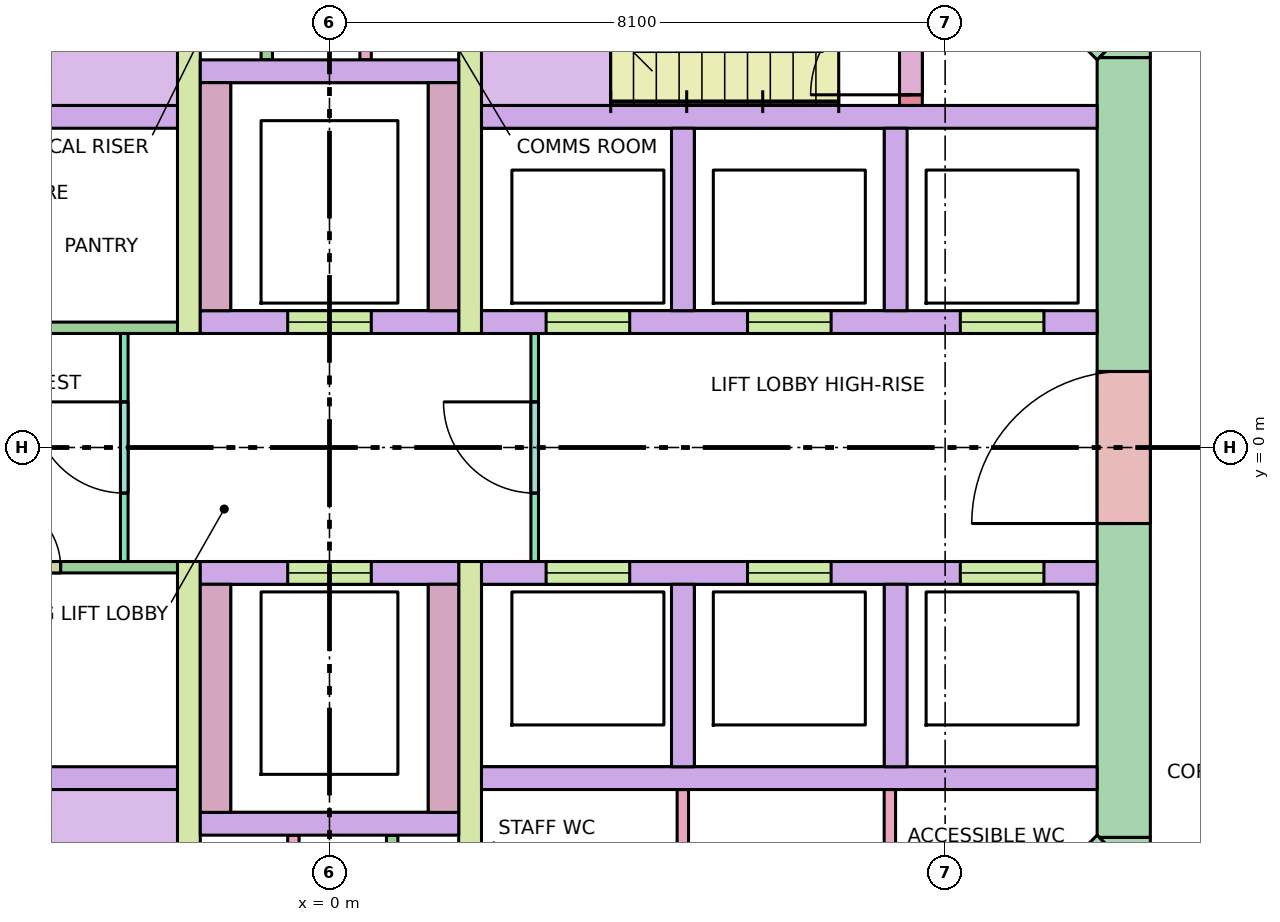
"""IFC4 building model, lengths in metres.
Left out: names, types, materials, properties, quantities, classifications, styles, units other than length and angle.
Written with IfcOpenShell. Run it as: python <this file> out.ifc"""

import sys

from ifc_helpers import new_model, si_unit, direction, frame, frame_2d, origin, place, context, subcontext, project, spatial, polyline, rectangle, outline, extrude, element, fill, save


model = new_model("IFC4")
c1 = context("Model", 3, precision=1e-05, world=origin(), true_north=direction((0.0, 1.0)))
c2 = subcontext(c1, "Body", "Model", "MODEL_VIEW")
j1 = project(units=[si_unit("LENGTHUNIT", "METRE"), si_unit("PLANEANGLEUNIT", "RADIAN")], contexts=[c1])
p1 = place(None, origin())
s1 = spatial("IfcSite", under=j1, at=p1, CompositionType="ELEMENT")
p2 = place(p1, origin())
s2 = spatial("IfcBuilding", under=s1, at=p2, CompositionType="ELEMENT")
p3 = place(p2, frame((0.0, 0.0, 203.9)))
s3 = spatial("IfcBuildingStorey", under=s2, at=p3, CompositionType="ELEMENT", Elevation=203.9)
p4 = place(p3, frame((10.45, -5.13, -0.28), z_axis=(0.0, 0.0, 1.0), x_axis=(0.0, 1.0, 0.0)))
e1 = element("IfcWall", 1, at=p4, inside=s3, PredefinedType="SHEAR", context=c2, shape_type="SweptSolid", body=[
    extrude(rectangle(XDim=10.26, YDim=0.7, at=frame_2d((5.13, 0.0))), origin(), (0.0, 0.0, 1.0), 3.7),
])
p5 = place(p4, frame((4.13, 0.0, 0.28)))
e2 = element("IfcOpeningElement", 2, at=p5, cuts=e1, PredefinedType="OPENING", context=c2, shape_type="SweptSolid", body=[
    extrude(rectangle(XDim=2.0, YDim=2.1, at=frame_2d((1.0, 1.05))), frame((0.0, 0.36, 0.0), z_axis=(0.0, -1.0, 0.0), x_axis=(1.0, 0.0, 0.0)), (0.0, 0.0, 1.0), 0.72),
])
p6 = place(p3, frame((7.347, 8.347, -0.28), z_axis=(0.0, 0.0, 1.0), x_axis=(0.707106781187, -0.707106781187, 0.0)))
e3 = element("IfcWall", 3, at=p6, inside=s3, PredefinedType="SHEAR", context=c2, shape_type="SweptSolid", body=[
    extrude(rectangle(XDim=4.243, YDim=0.7, at=frame_2d((2.121, 0.0))), origin(), (0.0, 0.0, 1.0), 3.7),
])
p7 = place(p6, frame((2.393, 0.0, 0.28)))
e4 = element("IfcOpeningElement", 4, at=p7, cuts=e3, PredefinedType="OPENING", context=c2, shape_type="SweptSolid", body=[
    extrude(rectangle(XDim=1.2, YDim=2.1, at=frame_2d((0.6, 1.05))), frame((0.0, 0.36, 0.0), z_axis=(0.0, -1.0, 0.0), x_axis=(1.0, 0.0, 0.0)), (0.0, 0.0, 1.0), 0.72),
])
p8 = place(p3, frame((10.347, -5.347, -0.28), z_axis=(0.0, 0.0, 1.0), x_axis=(-0.707106781187, -0.707106781187, 0.0)))
e5 = element("IfcWall", 5, at=p8, inside=s3, PredefinedType="SHEAR", context=c2, shape_type="SweptSolid", body=[
    extrude(rectangle(XDim=4.243, YDim=0.7, at=frame_2d((2.121, 0.0))), origin(), (0.0, 0.0, 1.0), 3.7),
])
p9 = place(p8, frame((0.52, 0.0, 0.28)))
e6 = element("IfcOpeningElement", 6, at=p9, cuts=e5, PredefinedType="OPENING", context=c2, shape_type="SweptSolid", body=[
    extrude(rectangle(XDim=0.9, YDim=2.1, at=frame_2d((0.45, 1.05))), frame((0.0, 0.36, 0.0), z_axis=(0.0, -1.0, 0.0), x_axis=(1.0, 0.0, 0.0)), (0.0, 0.0, 1.0), 0.72),
])
p10 = place(p3, frame((0.0, 0.0, -0.28)))
e7 = element("IfcWall", 7, at=p10, inside=s3, PredefinedType="SHEAR", context=c2, shape_type="SweptSolid", body=[
    extrude(outline(polyline([(10.8, -5.39), (10.595, -5.595), (10.595, -5.595), (10.595, -5.595), (10.13, -5.13), (10.8, -5.13), (10.8, -5.13), (10.8, -5.39)])), origin(), (0.0, 0.0, 1.0), 3.7),
])
p11 = place(p3, frame((0.0, 0.0, -0.28)))
e8 = element("IfcWall", 8, at=p11, inside=s3, PredefinedType="SHEAR", context=c2, shape_type="SweptSolid", body=[
    extrude(outline(polyline([(10.8, 5.39), (10.8, 5.13), (10.8, 5.13), (10.13, 5.13), (10.595, 5.595), (10.595, 5.595), (10.595, 5.595), (10.8, 5.39)])), origin(), (0.0, 0.0, 1.0), 3.7),
])
for number, where, z_axis, x_axis in (
    (9, (-10.1, 4.35, 0.0), (0.0, 0.0, 1.0), (1.0, 0.0, 0.0)),
    (10, (-10.1, -4.35, 0.0), (0.0, 0.0, 1.0), (1.0, 0.0, 0.0)),
    (11, (2.0, 4.35, 0.0), (0.0, 0.0, 1.0), (1.0, 0.0, 0.0)),
    (12, (2.0, -4.35, 0.0), (0.0, 0.0, 1.0), (1.0, 0.0, 0.0)),
):
    element("IfcWall", number, at=place(p3, frame(where, z_axis=z_axis, x_axis=x_axis)), inside=s3, PredefinedType="SOLIDWALL", context=c2, shape_type="SweptSolid", body=[
        extrude(rectangle(XDim=8.1, YDim=0.3, at=frame_2d((4.05, 0.0))), origin(), (0.0, 0.0, 1.0), 3.42),
    ])
p12 = place(p3, frame((2.0, 1.65, 0.0), z_axis=(0.0, 0.0, 1.0), x_axis=(1.0, 0.0, 0.0)))
e13 = element("IfcWall", 13, at=p12, inside=s3, PredefinedType="SOLIDWALL", context=c2, shape_type="SweptSolid", body=[
    extrude(rectangle(XDim=8.1, YDim=0.3, at=frame_2d((4.05, 0.0))), origin(), (0.0, 0.0, 1.0), 3.42),
])
p13 = place(p12, frame((0.85, 0.0, 0.0)))
e14 = element("IfcOpeningElement", 14, at=p13, cuts=e13, PredefinedType="OPENING", context=c2, shape_type="SweptSolid", body=[
    extrude(rectangle(XDim=1.1, YDim=2.1, at=frame_2d((0.55, 1.05))), frame((0.0, 0.16, 0.0), z_axis=(0.0, -1.0, 0.0), x_axis=(1.0, 0.0, 0.0)), (0.0, 0.0, 1.0), 0.32),
])
p14 = place(p12, frame((3.5, 0.0, 0.0)))
e15 = element("IfcOpeningElement", 15, at=p14, cuts=e13, PredefinedType="OPENING", context=c2, shape_type="SweptSolid", body=[
    extrude(rectangle(XDim=1.1, YDim=2.1, at=frame_2d((0.55, 1.05))), frame((0.0, 0.16, 0.0), z_axis=(0.0, -1.0, 0.0), x_axis=(1.0, 0.0, 0.0)), (0.0, 0.0, 1.0), 0.32),
])
p15 = place(p12, frame((6.3, 0.0, 0.0)))
e16 = element("IfcOpeningElement", 16, at=p15, cuts=e13, PredefinedType="OPENING", context=c2, shape_type="SweptSolid", body=[
    extrude(rectangle(XDim=1.1, YDim=2.1, at=frame_2d((0.55, 1.05))), frame((0.0, 0.16, 0.0), z_axis=(0.0, -1.0, 0.0), x_axis=(1.0, 0.0, 0.0)), (0.0, 0.0, 1.0), 0.32),
])
p16 = place(p3, frame((2.0, -1.65, 0.0), z_axis=(0.0, 0.0, 1.0), x_axis=(1.0, 0.0, 0.0)))
e17 = element("IfcWall", 17, at=p16, inside=s3, PredefinedType="SOLIDWALL", context=c2, shape_type="SweptSolid", body=[
    extrude(rectangle(XDim=8.1, YDim=0.3, at=frame_2d((4.05, 0.0))), origin(), (0.0, 0.0, 1.0), 3.42),
])
p17 = place(p16, frame((0.85, 0.0, 0.0)))
e18 = element("IfcOpeningElement", 18, at=p17, cuts=e17, PredefinedType="OPENING", context=c2, shape_type="SweptSolid", body=[
    extrude(rectangle(XDim=1.1, YDim=2.1, at=frame_2d((0.55, 1.05))), frame((0.0, 0.16, 0.0), z_axis=(0.0, -1.0, 0.0), x_axis=(1.0, 0.0, 0.0)), (0.0, 0.0, 1.0), 0.32),
])
p18 = place(p16, frame((3.5, 0.0, 0.0)))
e19 = element("IfcOpeningElement", 19, at=p18, cuts=e17, PredefinedType="OPENING", context=c2, shape_type="SweptSolid", body=[
    extrude(rectangle(XDim=1.1, YDim=2.1, at=frame_2d((0.55, 1.05))), frame((0.0, 0.16, 0.0), z_axis=(0.0, -1.0, 0.0), x_axis=(1.0, 0.0, 0.0)), (0.0, 0.0, 1.0), 0.32),
])
p19 = place(p16, frame((6.3, 0.0, 0.0)))
e20 = element("IfcOpeningElement", 20, at=p19, cuts=e17, PredefinedType="OPENING", context=c2, shape_type="SweptSolid", body=[
    extrude(rectangle(XDim=1.1, YDim=2.1, at=frame_2d((0.55, 1.05))), frame((0.0, 0.16, 0.0), z_axis=(0.0, -1.0, 0.0), x_axis=(1.0, 0.0, 0.0)), (0.0, 0.0, 1.0), 0.32),
])
for number, where, z_axis, x_axis in (
    (21, (4.65, 1.8, 0.0), (0.0, 0.0, 1.0), (0.0, 1.0, 0.0)),
    (22, (4.65, -4.2, 0.0), (0.0, 0.0, 1.0), (0.0, 1.0, 0.0)),
    (23, (7.45, 1.8, 0.0), (0.0, 0.0, 1.0), (0.0, 1.0, 0.0)),
    (24, (7.45, -4.2, 0.0), (0.0, 0.0, 1.0), (0.0, 1.0, 0.0)),
):
    element("IfcWall", number, at=place(p3, frame(where, z_axis=z_axis, x_axis=x_axis)), inside=s3, PredefinedType="SOLIDWALL", context=c2, shape_type="SweptSolid", body=[
        extrude(rectangle(XDim=2.4, YDim=0.3, at=frame_2d((1.2, 0.0))), origin(), (0.0, 0.0, 1.0), 3.42),
    ])
for number, where, z_axis, x_axis in (
    (25, (-1.85, 1.5, 0.0), (0.0, 0.0, 1.0), (0.0, 1.0, 0.0)),
    (26, (-1.85, -8.1, 0.0), (0.0, 0.0, 1.0), (0.0, 1.0, 0.0)),
    (27, (1.85, 1.5, 0.0), (0.0, 0.0, 1.0), (0.0, 1.0, 0.0)),
    (28, (1.85, -8.1, 0.0), (0.0, 0.0, 1.0), (0.0, 1.0, 0.0)),
):
    element("IfcWall", number, at=place(p3, frame(where, z_axis=z_axis, x_axis=x_axis)), inside=s3, PredefinedType="SHEAR", context=c2, shape_type="SweptSolid", body=[
        extrude(rectangle(XDim=6.6, YDim=0.3, at=frame_2d((3.3, 0.0))), origin(), (0.0, 0.0, 1.0), 3.42),
    ])
p20 = place(p3, frame((-1.7, 1.65, 0.0), z_axis=(0.0, 0.0, 1.0), x_axis=(1.0, 0.0, 0.0)))
e29 = element("IfcWall", 29, at=p20, inside=s3, PredefinedType="SOLIDWALL", context=c2, shape_type="SweptSolid", body=[
    extrude(rectangle(XDim=3.4, YDim=0.3, at=frame_2d((1.7, 0.0))), origin(), (0.0, 0.0, 1.0), 3.42),
])
p21 = place(p20, frame((1.15, 0.0, 0.0)))
e30 = element("IfcOpeningElement", 30, at=p21, cuts=e29, PredefinedType="OPENING", context=c2, shape_type="SweptSolid", body=[
    extrude(rectangle(XDim=1.1, YDim=2.1, at=frame_2d((0.55, 1.05))), frame((0.0, 0.16, 0.0), z_axis=(0.0, -1.0, 0.0), x_axis=(1.0, 0.0, 0.0)), (0.0, 0.0, 1.0), 0.32),
])
p22 = place(p3, frame((-1.7, -1.65, 0.0), z_axis=(0.0, 0.0, 1.0), x_axis=(1.0, 0.0, 0.0)))
e31 = element("IfcWall", 31, at=p22, inside=s3, PredefinedType="SOLIDWALL", context=c2, shape_type="SweptSolid", body=[
    extrude(rectangle(XDim=3.4, YDim=0.3, at=frame_2d((1.7, 0.0))), origin(), (0.0, 0.0, 1.0), 3.42),
])
p23 = place(p22, frame((1.15, 0.0, 0.0)))
e32 = element("IfcOpeningElement", 32, at=p23, cuts=e31, PredefinedType="OPENING", context=c2, shape_type="SweptSolid", body=[
    extrude(rectangle(XDim=1.1, YDim=2.1, at=frame_2d((0.55, 1.05))), frame((0.0, 0.16, 0.0), z_axis=(0.0, -1.0, 0.0), x_axis=(1.0, 0.0, 0.0)), (0.0, 0.0, 1.0), 0.32),
])
for number, where, z_axis, x_axis in (
    (33, (-1.5, 1.8, 0.0), (0.0, 0.0, 1.0), (0.0, 1.0, 0.0)),
    (34, (-1.5, -4.8, 0.0), (0.0, 0.0, 1.0), (0.0, 1.0, 0.0)),
    (35, (1.5, 1.8, 0.0), (0.0, 0.0, 1.0), (0.0, 1.0, 0.0)),
    (36, (1.5, -4.8, 0.0), (0.0, 0.0, 1.0), (0.0, 1.0, 0.0)),
):
    element("IfcWall", number, at=place(p3, frame(where, z_axis=z_axis, x_axis=x_axis)), inside=s3, PredefinedType="SOLIDWALL", context=c2, shape_type="SweptSolid", body=[
        extrude(rectangle(XDim=3.0, YDim=0.4, at=frame_2d((1.5, 0.0))), origin(), (0.0, 0.0, 1.0), 3.42),
    ])
for number, where, z_axis, x_axis in (
    (37, (-1.7, 4.95, 0.0), (0.0, 0.0, 1.0), (1.0, 0.0, 0.0)),
    (38, (-1.7, -4.95, 0.0), (0.0, 0.0, 1.0), (1.0, 0.0, 0.0)),
):
    element("IfcWall", number, at=place(p3, frame(where, z_axis=z_axis, x_axis=x_axis)), inside=s3, PredefinedType="SOLIDWALL", context=c2, shape_type="SweptSolid", body=[
        extrude(rectangle(XDim=3.4, YDim=0.3, at=frame_2d((1.7, 0.0))), origin(), (0.0, 0.0, 1.0), 3.42),
    ])
p24 = place(p3, frame((7.65, 4.5, 0.0), z_axis=(0.0, 0.0, 1.0), x_axis=(0.0, 1.0, 0.0)))
e39 = element("IfcWall", 39, at=p24, inside=s3, PredefinedType="SHEAR", context=c2, shape_type="SweptSolid", body=[
    extrude(rectangle(XDim=3.14, YDim=0.3, at=frame_2d((1.57, 0.0))), origin(), (0.0, 0.0, 1.0), 3.42),
])
p25 = place(p24, frame((0.14, 0.0, 0.0)))
e40 = element("IfcOpeningElement", 40, at=p25, cuts=e39, PredefinedType="OPENING", context=c2, shape_type="SweptSolid", body=[
    extrude(rectangle(XDim=1.32, YDim=2.1, at=frame_2d((0.66, 1.05))), frame((0.0, 0.16, 0.0), z_axis=(0.0, -1.0, 0.0), x_axis=(1.0, 0.0, 0.0)), (0.0, 0.0, 1.0), 0.32),
])
p26 = place(p3, frame((-2.7, -1.5, 0.0), z_axis=(0.0, 0.0, 1.0), x_axis=(0.0, 1.0, 0.0)))
e41 = element("IfcWall", 41, at=p26, inside=s3, PredefinedType="PARTITIONING", context=c2, shape_type="SweptSolid", body=[
    extrude(rectangle(XDim=3.0, YDim=0.1, at=frame_2d((1.5, 0.0))), origin(), (0.0, 0.0, 1.0), 3.42),
])
p27 = place(p26, frame((0.9, 0.0, 0.0)))
e42 = element("IfcOpeningElement", 42, at=p27, cuts=e41, PredefinedType="OPENING", context=c2, shape_type="SweptSolid", body=[
    extrude(rectangle(XDim=1.2, YDim=2.1, at=frame_2d((0.6, 1.05))), frame((0.0, 0.06, 0.0), z_axis=(0.0, -1.0, 0.0), x_axis=(1.0, 0.0, 0.0)), (0.0, 0.0, 1.0), 0.12),
])
p28 = place(p3, frame((2.7, -1.5, 0.0), z_axis=(0.0, 0.0, 1.0), x_axis=(0.0, 1.0, 0.0)))
e43 = element("IfcWall", 43, at=p28, inside=s3, PredefinedType="PARTITIONING", context=c2, shape_type="SweptSolid", body=[
    extrude(rectangle(XDim=3.0, YDim=0.1, at=frame_2d((1.5, 0.0))), origin(), (0.0, 0.0, 1.0), 3.42),
])
p29 = place(p28, frame((0.9, 0.0, 0.0)))
e44 = element("IfcOpeningElement", 44, at=p29, cuts=e43, PredefinedType="OPENING", context=c2, shape_type="SweptSolid", body=[
    extrude(rectangle(XDim=1.2, YDim=2.1, at=frame_2d((0.6, 1.05))), frame((0.0, 0.06, 0.0), z_axis=(0.0, -1.0, 0.0), x_axis=(1.0, 0.0, 0.0)), (0.0, 0.0, 1.0), 0.12),
])
for number, where, z_axis, x_axis in (
    (45, (-0.825, 5.1, 0.0), (0.0, 0.0, 1.0), (0.0, 1.0, 0.0)),
    (46, (0.825, -8.1, 0.0), (0.0, 0.0, 1.0), (0.0, 1.0, 0.0)),
    (47, (0.475, 5.1, 0.0), (0.0, 0.0, 1.0), (0.0, 1.0, 0.0)),
    (48, (-0.475, -8.1, 0.0), (0.0, 0.0, 1.0), (0.0, 1.0, 0.0)),
):
    element("IfcWall", number, at=place(p3, frame(where, z_axis=z_axis, x_axis=x_axis)), inside=s3, PredefinedType="PARTITIONING", context=c2, shape_type="SweptSolid", body=[
        extrude(rectangle(XDim=3.0, YDim=0.15, at=frame_2d((1.5, 0.0))), origin(), (0.0, 0.0, 1.0), 3.42),
    ])
p30 = place(p3, frame((4.649, -8.1, 0.0), z_axis=(0.0, 0.0, 1.0), x_axis=(0.0, 1.0, 0.0)))
e49 = element("IfcWall", 49, at=p30, inside=s3, PredefinedType="PARTITIONING", context=c2, shape_type="SweptSolid", body=[
    extrude(rectangle(XDim=3.6, YDim=0.15, at=frame_2d((1.8, 0.0))), origin(), (0.0, 0.0, 1.0), 3.42),
])
p31 = place(p3, frame((7.373, -7.752, 0.0), z_axis=(0.0, 0.0, 1.0), x_axis=(0.0, 1.0, 0.0)))
e50 = element("IfcWall", 50, at=p31, inside=s3, PredefinedType="PARTITIONING", context=c2, shape_type="SweptSolid", body=[
    extrude(rectangle(XDim=3.252, YDim=0.15, at=frame_2d((1.626, 0.0))), origin(), (0.0, 0.0, 1.0), 3.42),
])
p32 = place(p3, frame((-10.1, 1.575, 0.0), z_axis=(0.0, 0.0, 1.0), x_axis=(1.0, 0.0, 0.0)))
e51 = element("IfcWall", 51, at=p32, inside=s3, PredefinedType="PARTITIONING", context=c2, shape_type="SweptSolid", body=[
    extrude(rectangle(XDim=8.1, YDim=0.15, at=frame_2d((4.05, 0.0))), origin(), (0.0, 0.0, 1.0), 3.42),
])
p33 = place(p32, frame((0.33, 0.0, 0.0)))
e52 = element("IfcOpeningElement", 52, at=p33, cuts=e51, PredefinedType="OPENING", context=c2, shape_type="SweptSolid", body=[
    extrude(rectangle(XDim=0.9, YDim=2.1, at=frame_2d((0.45, 1.05))), frame((0.0, 0.085, 0.0), z_axis=(0.0, -1.0, 0.0), x_axis=(1.0, 0.0, 0.0)), (0.0, 0.0, 1.0), 0.17),
])
p34 = place(p32, frame((2.04, 0.0, 0.0)))
e53 = element("IfcOpeningElement", 53, at=p34, cuts=e51, PredefinedType="OPENING", context=c2, shape_type="SweptSolid", body=[
    extrude(rectangle(XDim=0.9, YDim=2.1, at=frame_2d((0.45, 1.05))), frame((0.0, 0.085, 0.0), z_axis=(0.0, -1.0, 0.0), x_axis=(1.0, 0.0, 0.0)), (0.0, 0.0, 1.0), 0.17),
])
p35 = place(p32, frame((5.31, 0.0, 0.0)))
e54 = element("IfcOpeningElement", 54, at=p35, cuts=e51, PredefinedType="OPENING", context=c2, shape_type="SweptSolid", body=[
    extrude(rectangle(XDim=0.9, YDim=2.1, at=frame_2d((0.45, 1.05))), frame((0.0, 0.085, 0.0), z_axis=(0.0, -1.0, 0.0), x_axis=(1.0, 0.0, 0.0)), (0.0, 0.0, 1.0), 0.17),
])
p36 = place(p3, frame((-10.1, -1.575, 0.0), z_axis=(0.0, 0.0, 1.0), x_axis=(1.0, 0.0, 0.0)))
e55 = element("IfcWall", 55, at=p36, inside=s3, PredefinedType="PARTITIONING", context=c2, shape_type="SweptSolid", body=[
    extrude(rectangle(XDim=8.1, YDim=0.15, at=frame_2d((4.05, 0.0))), origin(), (0.0, 0.0, 1.0), 3.42),
])
p37 = place(p36, frame((1.538, 0.0, 0.0)))
e56 = element("IfcOpeningElement", 56, at=p37, cuts=e55, PredefinedType="OPENING", context=c2, shape_type="SweptSolid", body=[
    extrude(rectangle(XDim=0.9, YDim=2.1, at=frame_2d((0.45, 1.05))), frame((0.0, 0.085, 0.0), z_axis=(0.0, -1.0, 0.0), x_axis=(1.0, 0.0, 0.0)), (0.0, 0.0, 1.0), 0.17),
])
p38 = place(p36, frame((5.663, 0.0, 0.0)))
e57 = element("IfcOpeningElement", 57, at=p38, cuts=e55, PredefinedType="OPENING", context=c2, shape_type="SweptSolid", body=[
    extrude(rectangle(XDim=0.9, YDim=2.1, at=frame_2d((0.45, 1.05))), frame((0.0, 0.085, 0.0), z_axis=(0.0, -1.0, 0.0), x_axis=(1.0, 0.0, 0.0)), (0.0, 0.0, 1.0), 0.17),
])
p39 = place(p13, origin())
e58 = element("IfcDoor", 58, at=p39, inside=s3, OperationType="DOUBLE_DOOR_SLIDING", PredefinedType="DOOR", context=c2, shape_type="SweptSolid", body=[
    extrude(rectangle(XDim=1.1, YDim=2.1, at=frame_2d((0.55, 1.05))), frame((0.0, 0.025, 0.0), z_axis=(0.0, -1.0, 0.0), x_axis=(1.0, 0.0, 0.0)), (0.0, 0.0, 1.0), 0.05),
])
fill(e14, e58)
p40 = place(p14, origin())
e59 = element("IfcDoor", 59, at=p40, inside=s3, OperationType="DOUBLE_DOOR_SLIDING", PredefinedType="DOOR", context=c2, shape_type="SweptSolid", body=[
    extrude(rectangle(XDim=1.1, YDim=2.1, at=frame_2d((0.55, 1.05))), frame((0.0, 0.025, 0.0), z_axis=(0.0, -1.0, 0.0), x_axis=(1.0, 0.0, 0.0)), (0.0, 0.0, 1.0), 0.05),
])
fill(e15, e59)
p41 = place(p15, origin())
e60 = element("IfcDoor", 60, at=p41, inside=s3, OperationType="DOUBLE_DOOR_SLIDING", PredefinedType="DOOR", context=c2, shape_type="SweptSolid", body=[
    extrude(rectangle(XDim=1.1, YDim=2.1, at=frame_2d((0.55, 1.05))), frame((0.0, 0.025, 0.0), z_axis=(0.0, -1.0, 0.0), x_axis=(1.0, 0.0, 0.0)), (0.0, 0.0, 1.0), 0.05),
])
fill(e16, e60)
p42 = place(p17, origin())
e61 = element("IfcDoor", 61, at=p42, inside=s3, OperationType="DOUBLE_DOOR_SLIDING", PredefinedType="DOOR", context=c2, shape_type="SweptSolid", body=[
    extrude(rectangle(XDim=1.1, YDim=2.1, at=frame_2d((0.55, 1.05))), frame((0.0, 0.025, 0.0), z_axis=(0.0, -1.0, 0.0), x_axis=(1.0, 0.0, 0.0)), (0.0, 0.0, 1.0), 0.05),
])
fill(e18, e61)
p43 = place(p18, origin())
e62 = element("IfcDoor", 62, at=p43, inside=s3, OperationType="DOUBLE_DOOR_SLIDING", PredefinedType="DOOR", context=c2, shape_type="SweptSolid", body=[
    extrude(rectangle(XDim=1.1, YDim=2.1, at=frame_2d((0.55, 1.05))), frame((0.0, 0.025, 0.0), z_axis=(0.0, -1.0, 0.0), x_axis=(1.0, 0.0, 0.0)), (0.0, 0.0, 1.0), 0.05),
])
fill(e19, e62)
p44 = place(p19, origin())
e63 = element("IfcDoor", 63, at=p44, inside=s3, OperationType="DOUBLE_DOOR_SLIDING", PredefinedType="DOOR", context=c2, shape_type="SweptSolid", body=[
    extrude(rectangle(XDim=1.1, YDim=2.1, at=frame_2d((0.55, 1.05))), frame((0.0, 0.025, 0.0), z_axis=(0.0, -1.0, 0.0), x_axis=(1.0, 0.0, 0.0)), (0.0, 0.0, 1.0), 0.05),
])
fill(e20, e63)
p45 = place(p21, origin())
e64 = element("IfcDoor", 64, at=p45, inside=s3, OperationType="DOUBLE_DOOR_SLIDING", PredefinedType="DOOR", context=c2, shape_type="SweptSolid", body=[
    extrude(rectangle(XDim=1.1, YDim=2.1, at=frame_2d((0.55, 1.05))), frame((0.0, 0.025, 0.0), z_axis=(0.0, -1.0, 0.0), x_axis=(1.0, 0.0, 0.0)), (0.0, 0.0, 1.0), 0.05),
])
fill(e30, e64)
p46 = place(p23, origin())
e65 = element("IfcDoor", 65, at=p46, inside=s3, OperationType="DOUBLE_DOOR_SLIDING", PredefinedType="DOOR", context=c2, shape_type="SweptSolid", body=[
    extrude(rectangle(XDim=1.1, YDim=2.1, at=frame_2d((0.55, 1.05))), frame((0.0, 0.025, 0.0), z_axis=(0.0, -1.0, 0.0), x_axis=(1.0, 0.0, 0.0)), (0.0, 0.0, 1.0), 0.05),
])
fill(e32, e65)
p47 = place(p25, origin())
e66 = element("IfcDoor", 66, at=p47, inside=s3, OperationType="DOUBLE_DOOR_SINGLE_SWING", PredefinedType="DOOR", context=c2, shape_type="SweptSolid", body=[
    extrude(rectangle(XDim=1.32, YDim=2.1, at=frame_2d((0.66, 1.05))), frame((0.0, 0.025, 0.0), z_axis=(0.0, -1.0, 0.0), x_axis=(1.0, 0.0, 0.0)), (0.0, 0.0, 1.0), 0.05),
])
fill(e40, e66)
p48 = place(p5, origin())
e67 = element("IfcDoor", 67, at=p48, inside=s3, OperationType="DOUBLE_DOOR_SINGLE_SWING", PredefinedType="DOOR", context=c2, shape_type="SweptSolid", body=[
    extrude(rectangle(XDim=2.0, YDim=2.1, at=frame_2d((1.0, 1.05))), frame((0.0, 0.025, 0.0), z_axis=(0.0, -1.0, 0.0), x_axis=(1.0, 0.0, 0.0)), (0.0, 0.0, 1.0), 0.05),
])
fill(e2, e67)
p49 = place(p27, origin())
e68 = element("IfcDoor", 68, at=p49, inside=s3, OperationType="SINGLE_SWING_RIGHT", PredefinedType="DOOR", context=c2, shape_type="SweptSolid", body=[
    extrude(rectangle(XDim=1.2, YDim=2.1, at=frame_2d((0.6, 1.05))), frame((0.0, 0.025, 0.0), z_axis=(0.0, -1.0, 0.0), x_axis=(1.0, 0.0, 0.0)), (0.0, 0.0, 1.0), 0.05),
])
fill(e42, e68)
p50 = place(p29, origin())
e69 = element("IfcDoor", 69, at=p50, inside=s3, OperationType="SINGLE_SWING_RIGHT", PredefinedType="DOOR", context=c2, shape_type="SweptSolid", body=[
    extrude(rectangle(XDim=1.2, YDim=2.1, at=frame_2d((0.6, 1.05))), frame((0.0, 0.025, 0.0), z_axis=(0.0, -1.0, 0.0), x_axis=(1.0, 0.0, 0.0)), (0.0, 0.0, 1.0), 0.05),
])
fill(e44, e69)
p51 = place(p38, origin())
e70 = element("IfcDoor", 70, at=p51, inside=s3, OperationType="SINGLE_SWING_LEFT", PredefinedType="DOOR", context=c2, shape_type="SweptSolid", body=[
    extrude(rectangle(XDim=0.9, YDim=2.1, at=frame_2d((0.45, 1.05))), frame((0.0, 0.025, 0.0), z_axis=(0.0, -1.0, 0.0), x_axis=(1.0, 0.0, 0.0)), (0.0, 0.0, 1.0), 0.05),
])
fill(e57, e70)
save(model, sys.argv[1])
